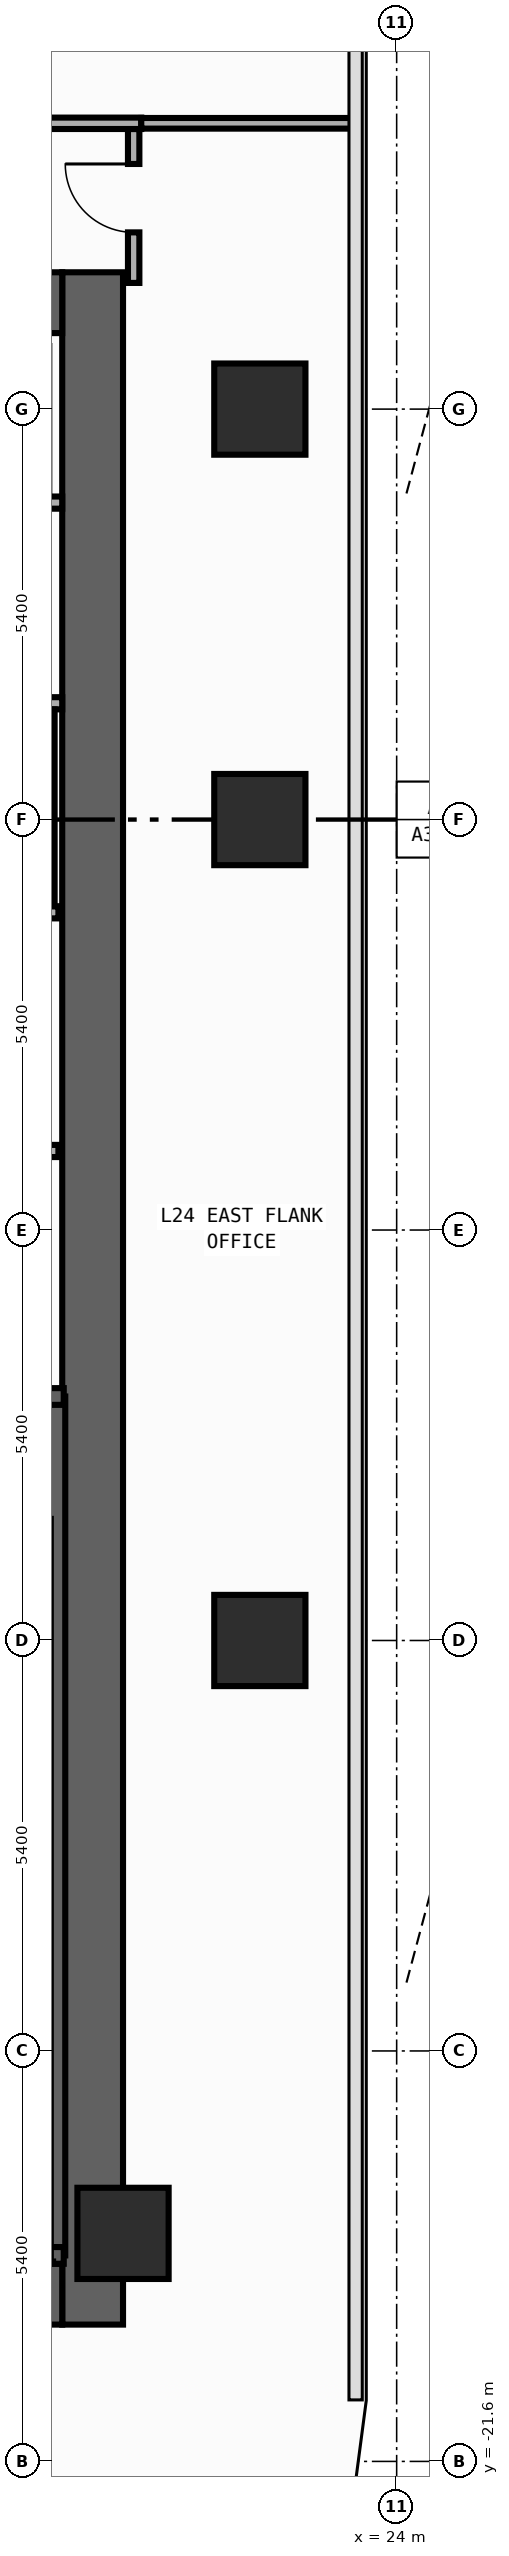
"""IFC4 building model, lengths in metres.
Left out: names, types, materials, properties, quantities, classifications, styles, units other than length and angle.
Written with IfcOpenShell. Run it as: python <this file> out.ifc"""

import sys

from ifc_helpers import new_model, si_unit, direction, frame, frame_2d, origin, origin_2d, place, context, subcontext, project, spatial, rectangle, extrude, element, fill, save


model = new_model("IFC4")
c1 = context("Model", 3, precision=1e-05, world=origin(), true_north=direction((0.0, 1.0)))
c2 = subcontext(c1, "Body", "Model", "MODEL_VIEW")
j1 = project(units=[si_unit("LENGTHUNIT", "METRE"), si_unit("PLANEANGLEUNIT", "RADIAN")], contexts=[c1])
p1 = place(None, origin())
s1 = spatial("IfcSite", under=j1, at=p1, CompositionType="ELEMENT")
p2 = place(p1, origin())
s2 = spatial("IfcBuilding", under=s1, at=p2, CompositionType="ELEMENT")
p3 = place(p2, frame((0.0, 0.0, 105.8)))
s3 = spatial("IfcBuildingStorey", under=s2, at=p3, CompositionType="ELEMENT", Elevation=105.8)
p4 = place(p3, frame((20.0, -19.8, 0.0), z_axis=(0.0, 0.0, 1.0), x_axis=(0.0, 1.0, 0.0)))
e1 = element("IfcWall", 1, at=p4, inside=s3, PredefinedType="SHEAR", context=c2, shape_type="SweptSolid", body=[
    extrude(rectangle(XDim=27.0, YDim=0.8, at=frame_2d((13.5, 0.0))), origin(), (0.0, 0.0, 1.0), 3.94),
])
for number, where, z_axis, x_axis in (
    (2, (12.8, -19.4, 0.0), (0.0, 0.0, 1.0), (1.0, 0.0, 0.0)),
    (3, (12.8, 6.8, 0.0), (0.0, 0.0, 1.0), (1.0, 0.0, 0.0)),
):
    element("IfcWall", number, at=place(p3, frame(where, z_axis=z_axis, x_axis=x_axis)), inside=s3, PredefinedType="SHEAR", context=c2, shape_type="SweptSolid", body=[
        extrude(rectangle(XDim=6.8, YDim=0.8, at=frame_2d((3.4, 0.0))), origin(), (0.0, 0.0, 1.0), 3.94),
    ])
p5 = place(p3, frame((19.53, -18.89, 0.0), z_axis=(0.0, 0.0, 1.0), x_axis=(0.0, 1.0, 0.0)))
e4 = element("IfcWall", 4, at=p5, inside=s3, PredefinedType="SHEAR", context=c2, shape_type="SweptSolid", body=[
    extrude(rectangle(XDim=11.3, YDim=0.22, at=frame_2d((5.65, 0.0))), origin(), (0.0, 0.0, 1.0), 3.94),
])
p6 = place(p3, frame((15.705, -18.89, 0.0), z_axis=(0.0, 0.0, 1.0), x_axis=(1.0, 0.0, 0.0)))
e5 = element("IfcWall", 5, at=p6, inside=s3, PredefinedType="SHEAR", context=c2, shape_type="SweptSolid", body=[
    extrude(rectangle(XDim=3.915, YDim=0.22, at=frame_2d((1.958, 0.0))), origin(), (0.0, 0.0, 1.0), 3.94),
])
p7 = place(p3, frame((19.62, -7.59, 0.0), z_axis=(0.0, 0.0, 1.0), x_axis=(-1.0, 0.0, 0.0)))
e6 = element("IfcWall", 6, at=p7, inside=s3, PredefinedType="SHEAR", context=c2, shape_type="SweptSolid", body=[
    extrude(rectangle(XDim=3.915, YDim=0.22, at=frame_2d((1.958, 0.0))), origin(), (0.0, 0.0, 1.0), 3.94),
])
p8 = place(p7, frame((1.08, 0.0, 0.0)))
e7 = element("IfcOpeningElement", 7, at=p8, cuts=e6, PredefinedType="OPENING", context=c2, shape_type="SweptSolid", body=[
    extrude(rectangle(XDim=1.1, YDim=2.2, at=frame_2d((0.55, 1.1))), frame((0.0, 0.12, 0.0), z_axis=(0.0, -1.0, 0.0), x_axis=(1.0, 0.0, 0.0)), (0.0, 0.0, 1.0), 0.24),
])
for number, where, z_axis, x_axis in (
    (8, (20.4, -18.6, 0.0), (0.0, 0.0, 1.0), (1.0, 0.0, 0.0)),
    (9, (22.2, -10.8, 0.0), (0.0, 0.0, 1.0), (1.0, 0.0, 0.0)),
    (10, (22.2, 0.0, 0.0), (0.0, 0.0, 1.0), (1.0, 0.0, 0.0)),
    (11, (22.2, 5.4, 0.0), (0.0, 0.0, 1.0), (1.0, 0.0, 0.0)),
):
    element("IfcColumn", number, at=place(p3, frame(where, z_axis=z_axis, x_axis=x_axis)), inside=s3, PredefinedType="COLUMN", context=c2, shape_type="SweptSolid", body=[
        extrude(rectangle(XDim=1.2, YDim=1.2, at=origin_2d()), origin(), (0.0, 0.0, 1.0), 4.2),
    ])
p9 = place(p3, frame((15.75, -4.36, 0.0), z_axis=(0.0, 0.0, 1.0), x_axis=(1.0, 0.0, 0.0)))
e12 = element("IfcWall", 12, at=p9, inside=s3, PredefinedType="STANDARD", context=c2, shape_type="SweptSolid", body=[
    extrude(rectangle(XDim=3.8, YDim=0.16, at=frame_2d((1.9, 0.0))), origin(), (0.0, 0.0, 1.0), 3.94),
])
p10 = place(p9, frame((1.47, 0.0, 0.0)))
e13 = element("IfcOpeningElement", 13, at=p10, cuts=e12, PredefinedType="OPENING", context=c2, shape_type="SweptSolid", body=[
    extrude(rectangle(XDim=1.15, YDim=2.2, at=frame_2d((0.575, 1.1))), frame((0.0, 0.09, 0.0), z_axis=(0.0, -1.0, 0.0), x_axis=(1.0, 0.0, 0.0)), (0.0, 0.0, 1.0), 0.18),
])
p11 = place(p3, frame((15.75, -1.22, 0.0), z_axis=(0.0, 0.0, 1.0), x_axis=(1.0, 0.0, 0.0)))
e14 = element("IfcWall", 14, at=p11, inside=s3, PredefinedType="STANDARD", context=c2, shape_type="SweptSolid", body=[
    extrude(rectangle(XDim=3.8, YDim=0.16, at=frame_2d((1.9, 0.0))), origin(), (0.0, 0.0, 1.0), 3.94),
])
for number, where, z_axis, x_axis in (
    (15, (17.31, 4.17, 0.0), (0.0, 0.0, 1.0), (1.0, 0.0, 0.0)),
    (16, (17.31, 1.53, 0.0), (0.0, 0.0, 1.0), (1.0, 0.0, 0.0)),
):
    element("IfcWall", number, at=place(p3, frame(where, z_axis=z_axis, x_axis=x_axis)), inside=s3, PredefinedType="PARTITIONING", context=c2, shape_type="SweptSolid", body=[
        extrude(rectangle(XDim=2.29, YDim=0.16, at=frame_2d((1.145, 0.0))), origin(), (0.0, 0.0, 1.0), 3.94),
    ])
p12 = place(p3, frame((20.54, 7.06, 0.0), z_axis=(0.0, 0.0, 1.0), x_axis=(0.0, 1.0, 0.0)))
e17 = element("IfcWall", 17, at=p12, inside=s3, PredefinedType="PARTITIONING", context=c2, shape_type="SweptSolid", body=[
    extrude(rectangle(XDim=2.025, YDim=0.15, at=frame_2d((1.012, 0.0))), origin(), (0.0, 0.0, 1.0), 3.94),
])
p13 = place(p12, frame((0.665, 0.0, 0.0)))
e18 = element("IfcOpeningElement", 18, at=p13, cuts=e17, PredefinedType="OPENING", context=c2, shape_type="SweptSolid", body=[
    extrude(rectangle(XDim=0.9, YDim=2.15, at=frame_2d((0.45, 1.075))), frame((0.0, 0.085, 0.0), z_axis=(0.0, -1.0, 0.0), x_axis=(1.0, 0.0, 0.0)), (0.0, 0.0, 1.0), 0.17),
])
p14 = place(p3, frame((11.81, 9.16, 0.0), z_axis=(0.0, 0.0, 1.0), x_axis=(1.0, 0.0, 0.0)))
e19 = element("IfcWall", 19, at=p14, inside=s3, PredefinedType="PARTITIONING", context=c2, shape_type="SweptSolid", body=[
    extrude(rectangle(XDim=8.83, YDim=0.15, at=frame_2d((4.415, 0.0))), origin(), (0.0, 0.0, 1.0), 3.94),
])
p15 = place(p14, frame((5.067, 0.0, 0.0)))
e20 = element("IfcOpeningElement", 20, at=p15, cuts=e19, PredefinedType="OPENING", context=c2, shape_type="SweptSolid", body=[
    extrude(rectangle(XDim=0.9, YDim=2.15, at=frame_2d((0.45, 1.075))), frame((0.0, 0.085, 0.0), z_axis=(0.0, -1.0, 0.0), x_axis=(1.0, 0.0, 0.0)), (0.0, 0.0, 1.0), 0.17),
])
p16 = place(p3, frame((20.64, 9.16, 0.0), z_axis=(0.0, 0.0, 1.0), x_axis=(1.0, 0.0, 0.0)))
e21 = element("IfcWall", 21, at=p16, inside=s3, PredefinedType="PARTITIONING", context=c2, shape_type="SweptSolid", body=[
    extrude(rectangle(XDim=2.815, YDim=0.14, at=frame_2d((1.408, 0.0))), origin(), (0.0, 0.0, 1.0), 3.94),
])
p17 = place(p3, frame((19.45, 1.45, 0.0), z_axis=(0.0, 0.0, 1.0), x_axis=(0.0, -1.0, 0.0)))
e22 = element("IfcWall", 22, at=p17, inside=s3, PredefinedType="PARTITIONING", context=c2, shape_type="SweptSolid", body=[
    extrude(rectangle(XDim=2.59, YDim=0.1, at=frame_2d((1.295, 0.0))), origin(), (0.0, 0.0, 1.0), 3.94),
])
p18 = place(p13, origin())
e23 = element("IfcDoor", 23, at=p18, inside=s3, OperationType="SINGLE_SWING_RIGHT", PredefinedType="DOOR", context=c2, shape_type="SweptSolid", body=[
    extrude(rectangle(XDim=0.9, YDim=2.15, at=frame_2d((0.45, 1.075))), frame((0.0, 0.025, 0.0), z_axis=(0.0, -1.0, 0.0), x_axis=(1.0, 0.0, 0.0)), (0.0, 0.0, 1.0), 0.05),
])
fill(e18, e23)
save(model, sys.argv[1])
